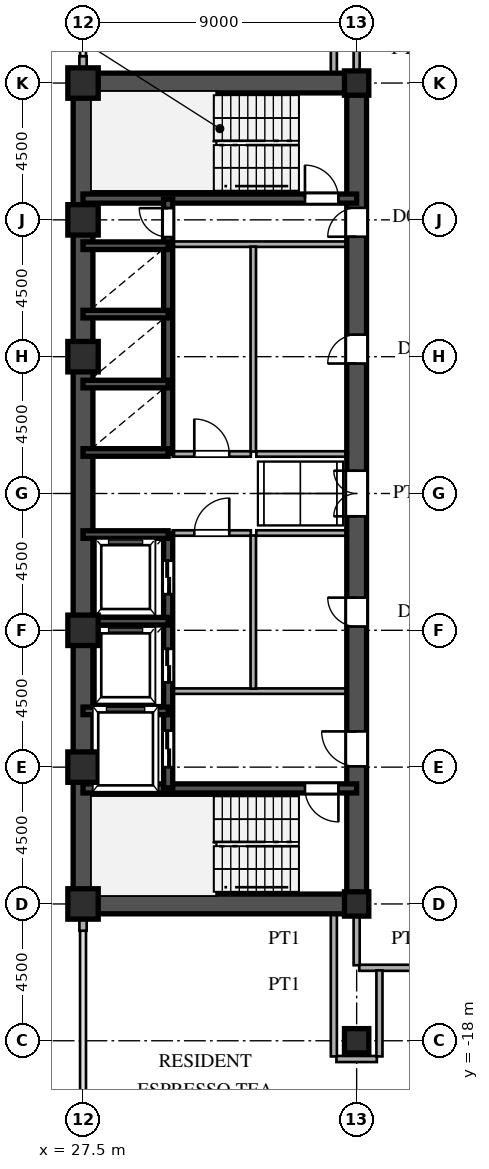
"""IFC4 building model, lengths in metres.
Left out: names, types, materials, properties, quantities, classifications, styles, units other than length and angle.
Written with IfcOpenShell. Run it as: python <this file> out.ifc"""

import sys

from ifc_helpers import new_model, si_unit, direction, frame, frame_2d, origin, origin_2d, place, context, subcontext, project, spatial, rectangle, hollow_rectangle, i_section, extrude, source, transform, mapped, element, fill, save


model = new_model("IFC4")
c1 = context("Model", 3, precision=1e-05, world=origin(), true_north=direction((0.0, 1.0)))
c2 = subcontext(c1, "Body", "Model", "MODEL_VIEW")
j1 = project(units=[si_unit("LENGTHUNIT", "METRE"), si_unit("PLANEANGLEUNIT", "RADIAN")], contexts=[c1])
p1 = place(None, origin())
s1 = spatial("IfcSite", under=j1, at=p1, CompositionType="ELEMENT")
p2 = place(p1, origin())
s2 = spatial("IfcBuilding", under=s1, at=p2, CompositionType="ELEMENT")
p3 = place(p2, frame((0.0, 0.0, 106.8)))
s3 = spatial("IfcBuildingStorey", under=s2, at=p3, CompositionType="ELEMENT", Elevation=106.8)
m1 = source(origin(), c2, "Body", "SweptSolid", [
    extrude(hollow_rectangle(XDim=1.0, YDim=1.0, WallThickness=0.042, at=origin_2d()), origin(), (0.0, 0.0, 1.0), 3.6),
])
for number, where, z_axis, x_axis in (
    (1, (27.5, -13.5, 0.0), (0.0, 0.0, 1.0), (1.0, 0.0, 0.0)),
    (2, (27.5, -9.0, 0.0), (0.0, 0.0, 1.0), (1.0, 0.0, 0.0)),
    (3, (27.5, -4.5, 0.0), (0.0, 0.0, 1.0), (1.0, 0.0, 0.0)),
    (4, (27.5, 4.5, 0.0), (0.0, 0.0, 1.0), (1.0, 0.0, 0.0)),
    (5, (27.5, 9.0, 0.0), (0.0, 0.0, 1.0), (1.0, 0.0, 0.0)),
    (6, (27.5, 13.5, 0.0), (0.0, 0.0, 1.0), (1.0, 0.0, 0.0)),
):
    element("IfcColumn", number, at=place(p3, frame(where, z_axis=z_axis, x_axis=x_axis)), inside=s3, PredefinedType="COLUMN", context=c2, shape_type="MappedRepresentation", body=[
        mapped(m1, transform((0.0, 0.0, 0.0), scale=1.0)),
    ])
m2 = source(origin(), c2, "Body", "SweptSolid", [
    extrude(i_section(OverallWidth=0.8, OverallDepth=0.8, WebThickness=0.032, FlangeThickness=0.05, at=origin_2d()), origin(), (0.0, 0.0, 1.0), 3.6),
])
for number, where, z_axis, x_axis in (
    (7, (36.5, -18.0, 0.0), (0.0, 0.0, 1.0), (1.0, 0.0, 0.0)),
    (8, (36.5, -13.5, 0.0), (0.0, 0.0, 1.0), (1.0, 0.0, 0.0)),
    (9, (36.5, 13.5, 0.0), (0.0, 0.0, 1.0), (1.0, 0.0, 0.0)),
):
    element("IfcColumn", number, at=place(p3, frame(where, z_axis=z_axis, x_axis=x_axis)), inside=s3, PredefinedType="COLUMN", context=c2, shape_type="MappedRepresentation", body=[
        mapped(m2, transform((0.0, 0.0, 0.0), scale=1.0)),
    ])
for number, where, z_axis, x_axis in (
    (10, (27.5, -14.38, 0.0), (0.0, 0.0, 1.0), (0.0, 1.0, 0.0)),
    (11, (27.5, 13.83, 0.0), (0.0, 0.0, 1.0), (0.0, 1.0, 0.0)),
):
    element("IfcWall", number, at=place(p3, frame(where, z_axis=z_axis, x_axis=x_axis)), inside=s3, PredefinedType="SOLIDWALL", context=c2, shape_type="SweptSolid", body=[
        extrude(rectangle(XDim=0.55, YDim=0.24, at=frame_2d((0.275, 0.0))), origin(), (0.0, 0.0, 1.0), 1.88),
    ])
for number, where, z_axis, x_axis in (
    (12, (27.5, -13.5, 0.0), (0.0, 0.0, 1.0), (0.0, 1.0, 0.0)),
    (13, (27.5, 1.3, 0.0), (0.0, 0.0, 1.0), (0.0, 1.0, 0.0)),
):
    element("IfcWall", number, at=place(p3, frame(where, z_axis=z_axis, x_axis=x_axis)), inside=s3, PredefinedType="SHEAR", context=c2, shape_type="SweptSolid", body=[
        extrude(rectangle(XDim=12.2, YDim=0.65, at=frame_2d((6.1, 0.0))), origin(), (0.0, 0.0, 1.0), 3.38),
    ])
p4 = place(p3, frame((27.5, -1.3, 0.0), z_axis=(0.0, 0.0, 1.0), x_axis=(0.0, 1.0, 0.0)))
e14 = element("IfcWall", 14, at=p4, inside=s3, PredefinedType="SHEAR", context=c2, shape_type="SweptSolid", body=[
    extrude(rectangle(XDim=2.6, YDim=0.65, at=frame_2d((1.3, 0.0))), origin(), (0.0, 0.0, 1.0), 3.38),
])
for number, where, z_axis, x_axis in (
    (15, (27.5, -13.5, 0.0), (0.0, 0.0, 1.0), (1.0, 0.0, 0.0)),
    (16, (27.5, 13.5, 0.0), (0.0, 0.0, 1.0), (1.0, 0.0, 0.0)),
):
    element("IfcWall", number, at=place(p3, frame(where, z_axis=z_axis, x_axis=x_axis)), inside=s3, PredefinedType="SHEAR", context=c2, shape_type="SweptSolid", body=[
        extrude(rectangle(XDim=9.0, YDim=0.65, at=frame_2d((4.5, 0.0))), origin(), (0.0, 0.0, 1.0), 3.38),
    ])
p5 = place(p3, frame((36.5, -13.65, 0.0), z_axis=(0.0, 0.0, 1.0), x_axis=(0.0, 1.0, 0.0)))
e17 = element("IfcWall", 17, at=p5, inside=s3, PredefinedType="SHEAR", context=c2, shape_type="SweptSolid", body=[
    extrude(rectangle(XDim=7.15, YDim=0.65, at=frame_2d((3.575, 0.0))), origin(), (0.0, 0.0, 1.0), 3.38),
])
p6 = place(p5, frame((4.675, 0.0, 0.0)))
e18 = element("IfcOpeningElement", 18, at=p6, cuts=e17, PredefinedType="OPENING", context=c2, shape_type="SweptSolid", body=[
    extrude(rectangle(XDim=1.15, YDim=2.2, at=frame_2d((0.575, 1.1))), frame((0.0, 0.335, 0.0), z_axis=(0.0, -1.0, 0.0), x_axis=(1.0, 0.0, 0.0)), (0.0, 0.0, 1.0), 0.67),
])
p7 = place(p3, frame((36.5, -1.3, 0.0), z_axis=(0.0, 0.0, 1.0), x_axis=(0.0, 1.0, 0.0)))
e19 = element("IfcWall", 19, at=p7, inside=s3, PredefinedType="SHEAR", context=c2, shape_type="SweptSolid", body=[
    extrude(rectangle(XDim=2.6, YDim=0.65, at=frame_2d((1.3, 0.0))), origin(), (0.0, 0.0, 1.0), 3.38),
])
p8 = place(p7, frame((0.55, 0.0, 0.0)))
e20 = element("IfcOpeningElement", 20, at=p8, cuts=e19, PredefinedType="OPENING", context=c2, shape_type="SweptSolid", body=[
    extrude(rectangle(XDim=1.5, YDim=2.3, at=frame_2d((0.75, 1.15))), frame((0.0, 0.335, 0.0), z_axis=(0.0, -1.0, 0.0), x_axis=(1.0, 0.0, 0.0)), (0.0, 0.0, 1.0), 0.67),
])
p9 = place(p3, frame((36.5, 8.2, 0.0), z_axis=(0.0, 0.0, 1.0), x_axis=(0.0, 1.0, 0.0)))
e21 = element("IfcWall", 21, at=p9, inside=s3, PredefinedType="SHEAR", context=c2, shape_type="SweptSolid", body=[
    extrude(rectangle(XDim=5.45, YDim=0.65, at=frame_2d((2.725, 0.0))), origin(), (0.0, 0.0, 1.0), 3.38),
])
p10 = place(p9, frame((0.245, 0.0, 0.0)))
e22 = element("IfcOpeningElement", 22, at=p10, cuts=e21, PredefinedType="OPENING", context=c2, shape_type="SweptSolid", body=[
    extrude(rectangle(XDim=0.95, YDim=2.15, at=frame_2d((0.475, 1.075))), frame((0.0, 0.335, 0.0), z_axis=(0.0, -1.0, 0.0), x_axis=(1.0, 0.0, 0.0)), (0.0, 0.0, 1.0), 0.67),
])
p11 = place(p3, frame((36.5, -6.5, 0.0), z_axis=(0.0, 0.0, 1.0), x_axis=(0.0, 1.0, 0.0)))
e23 = element("IfcWall", 23, at=p11, inside=s3, PredefinedType="SHEAR", context=c2, shape_type="SweptSolid", body=[
    extrude(rectangle(XDim=5.2, YDim=0.65, at=frame_2d((2.6, 0.0))), origin(), (0.0, 0.0, 1.0), 3.38),
])
p12 = place(p11, frame((2.125, 0.0, 0.0)))
e24 = element("IfcOpeningElement", 24, at=p12, cuts=e23, PredefinedType="OPENING", context=c2, shape_type="SweptSolid", body=[
    extrude(rectangle(XDim=0.95, YDim=2.15, at=frame_2d((0.475, 1.075))), frame((0.0, 0.335, 0.0), z_axis=(0.0, -1.0, 0.0), x_axis=(1.0, 0.0, 0.0)), (0.0, 0.0, 1.0), 0.67),
])
p13 = place(p3, frame((36.5, 1.3, 0.0), z_axis=(0.0, 0.0, 1.0), x_axis=(0.0, 1.0, 0.0)))
e25 = element("IfcWall", 25, at=p13, inside=s3, PredefinedType="SHEAR", context=c2, shape_type="SweptSolid", body=[
    extrude(rectangle(XDim=6.9, YDim=0.65, at=frame_2d((3.45, 0.0))), origin(), (0.0, 0.0, 1.0), 3.38),
])
p14 = place(p13, frame((2.975, 0.0, 0.0)))
e26 = element("IfcOpeningElement", 26, at=p14, cuts=e25, PredefinedType="OPENING", context=c2, shape_type="SweptSolid", body=[
    extrude(rectangle(XDim=0.95, YDim=2.15, at=frame_2d((0.475, 1.075))), frame((0.0, 0.335, 0.0), z_axis=(0.0, -1.0, 0.0), x_axis=(1.0, 0.0, 0.0)), (0.0, 0.0, 1.0), 0.67),
])
p15 = place(p3, frame((27.5, -9.7, 0.0), z_axis=(0.0, 0.0, 1.0), x_axis=(1.0, 0.0, 0.0)))
e27 = element("IfcWall", 27, at=p15, inside=s3, PredefinedType="SHEAR", context=c2, shape_type="SweptSolid", body=[
    extrude(rectangle(XDim=9.0, YDim=0.3, at=frame_2d((4.5, 0.0))), origin(), (0.0, 0.0, 1.0), 3.38),
])
p16 = place(p15, frame((7.3, 0.0, 0.0)))
e28 = element("IfcOpeningElement", 28, at=p16, cuts=e27, PredefinedType="OPENING", context=c2, shape_type="SweptSolid", body=[
    extrude(rectangle(XDim=1.1, YDim=2.2, at=frame_2d((0.55, 1.1))), frame((0.0, 0.16, 0.0), z_axis=(0.0, -1.0, 0.0), x_axis=(1.0, 0.0, 0.0)), (0.0, 0.0, 1.0), 0.32),
])
p17 = place(p3, frame((27.5, 9.7, 0.0), z_axis=(0.0, 0.0, 1.0), x_axis=(1.0, 0.0, 0.0)))
e29 = element("IfcWall", 29, at=p17, inside=s3, PredefinedType="SHEAR", context=c2, shape_type="SweptSolid", body=[
    extrude(rectangle(XDim=9.0, YDim=0.3, at=frame_2d((4.5, 0.0))), origin(), (0.0, 0.0, 1.0), 3.38),
])
p18 = place(p17, frame((7.3, 0.0, 0.0)))
e30 = element("IfcOpeningElement", 30, at=p18, cuts=e29, PredefinedType="OPENING", context=c2, shape_type="SweptSolid", body=[
    extrude(rectangle(XDim=1.1, YDim=2.2, at=frame_2d((0.55, 1.1))), frame((0.0, 0.16, 0.0), z_axis=(0.0, -1.0, 0.0), x_axis=(1.0, 0.0, 0.0)), (0.0, 0.0, 1.0), 0.32),
])
for number, where, z_axis, x_axis in (
    (31, (27.5, -7.15, 0.0), (0.0, 0.0, 1.0), (1.0, 0.0, 0.0)),
    (32, (27.5, -4.2, 0.0), (0.0, 0.0, 1.0), (1.0, 0.0, 0.0)),
    (33, (27.5, -1.35, 0.0), (0.0, 0.0, 1.0), (1.0, 0.0, 0.0)),
    (34, (27.5, 1.35, 0.0), (0.0, 0.0, 1.0), (1.0, 0.0, 0.0)),
    (35, (27.5, 3.6, 0.0), (0.0, 0.0, 1.0), (1.0, 0.0, 0.0)),
    (36, (27.5, 5.9, 0.0), (0.0, 0.0, 1.0), (1.0, 0.0, 0.0)),
    (37, (27.5, 8.15, 0.0), (0.0, 0.0, 1.0), (1.0, 0.0, 0.0)),
):
    element("IfcWall", number, at=place(p3, frame(where, z_axis=z_axis, x_axis=x_axis)), inside=s3, PredefinedType="SHEAR", context=c2, shape_type="SweptSolid", body=[
        extrude(rectangle(XDim=2.8, YDim=0.25, at=frame_2d((1.4, 0.0))), origin(), (0.0, 0.0, 1.0), 3.38),
    ])
p19 = place(p3, frame((30.3, -9.68, 0.0), z_axis=(0.0, 0.0, 1.0), x_axis=(0.0, 1.0, 0.0)))
e38 = element("IfcWall", 38, at=p19, inside=s3, PredefinedType="SHEAR", context=c2, shape_type="SweptSolid", body=[
    extrude(rectangle(XDim=2.56, YDim=0.3, at=frame_2d((1.28, 0.0))), origin(), (0.0, 0.0, 1.0), 3.38),
])
p20 = place(p19, frame((0.68, 0.0, 0.0)))
e39 = element("IfcOpeningElement", 39, at=p20, cuts=e38, PredefinedType="OPENING", context=c2, shape_type="SweptSolid", body=[
    extrude(rectangle(XDim=1.2, YDim=2.25, at=frame_2d((0.6, 1.125))), frame((0.0, 0.16, 0.0), z_axis=(0.0, -1.0, 0.0), x_axis=(1.0, 0.0, 0.0)), (0.0, 0.0, 1.0), 0.32),
])
p21 = place(p3, frame((30.3, -7.12, 0.0), z_axis=(0.0, 0.0, 1.0), x_axis=(0.0, 1.0, 0.0)))
e40 = element("IfcWall", 40, at=p21, inside=s3, PredefinedType="SHEAR", context=c2, shape_type="SweptSolid", body=[
    extrude(rectangle(XDim=2.92, YDim=0.3, at=frame_2d((1.46, 0.0))), origin(), (0.0, 0.0, 1.0), 3.38),
])
p22 = place(p21, frame((0.91, 0.0, 0.0)))
e41 = element("IfcOpeningElement", 41, at=p22, cuts=e40, PredefinedType="OPENING", context=c2, shape_type="SweptSolid", body=[
    extrude(rectangle(XDim=1.1, YDim=2.2, at=frame_2d((0.55, 1.1))), frame((0.0, 0.16, 0.0), z_axis=(0.0, -1.0, 0.0), x_axis=(1.0, 0.0, 0.0)), (0.0, 0.0, 1.0), 0.32),
])
p23 = place(p3, frame((30.3, -4.2, 0.0), z_axis=(0.0, 0.0, 1.0), x_axis=(0.0, 1.0, 0.0)))
e42 = element("IfcWall", 42, at=p23, inside=s3, PredefinedType="SHEAR", context=c2, shape_type="SweptSolid", body=[
    extrude(rectangle(XDim=2.88, YDim=0.3, at=frame_2d((1.44, 0.0))), origin(), (0.0, 0.0, 1.0), 3.38),
])
p24 = place(p23, frame((0.89, 0.0, 0.0)))
e43 = element("IfcOpeningElement", 43, at=p24, cuts=e42, PredefinedType="OPENING", context=c2, shape_type="SweptSolid", body=[
    extrude(rectangle(XDim=1.1, YDim=2.2, at=frame_2d((0.55, 1.1))), frame((0.0, 0.16, 0.0), z_axis=(0.0, -1.0, 0.0), x_axis=(1.0, 0.0, 0.0)), (0.0, 0.0, 1.0), 0.32),
])
p25 = place(p3, frame((30.3, 1.32, 0.0), z_axis=(0.0, 0.0, 1.0), x_axis=(0.0, 1.0, 0.0)))
e44 = element("IfcWall", 44, at=p25, inside=s3, PredefinedType="SHEAR", context=c2, shape_type="SweptSolid", body=[
    extrude(rectangle(XDim=2.28, YDim=0.3, at=frame_2d((1.14, 0.0))), origin(), (0.0, 0.0, 1.0), 3.38),
])
p26 = place(p3, frame((30.3, 3.6, 0.0), z_axis=(0.0, 0.0, 1.0), x_axis=(0.0, 1.0, 0.0)))
e45 = element("IfcWall", 45, at=p26, inside=s3, PredefinedType="SHEAR", context=c2, shape_type="SweptSolid", body=[
    extrude(rectangle(XDim=2.3, YDim=0.3, at=frame_2d((1.15, 0.0))), origin(), (0.0, 0.0, 1.0), 3.38),
])
p27 = place(p3, frame((30.3, 5.9, 0.0), z_axis=(0.0, 0.0, 1.0), x_axis=(0.0, 1.0, 0.0)))
e46 = element("IfcWall", 46, at=p27, inside=s3, PredefinedType="SHEAR", context=c2, shape_type="SweptSolid", body=[
    extrude(rectangle(XDim=2.25, YDim=0.3, at=frame_2d((1.125, 0.0))), origin(), (0.0, 0.0, 1.0), 3.38),
])
p28 = place(p3, frame((30.3, 8.15, 0.0), z_axis=(0.0, 0.0, 1.0), x_axis=(0.0, 1.0, 0.0)))
e47 = element("IfcWall", 47, at=p28, inside=s3, PredefinedType="SHEAR", context=c2, shape_type="SweptSolid", body=[
    extrude(rectangle(XDim=1.53, YDim=0.3, at=frame_2d((0.765, 0.0))), origin(), (0.0, 0.0, 1.0), 3.38),
])
p29 = place(p28, frame((0.285, 0.0, 0.0)))
e48 = element("IfcOpeningElement", 48, at=p29, cuts=e47, PredefinedType="OPENING", context=c2, shape_type="SweptSolid", body=[
    extrude(rectangle(XDim=0.95, YDim=2.15, at=frame_2d((0.475, 1.075))), frame((0.0, 0.16, 0.0), z_axis=(0.0, -1.0, 0.0), x_axis=(1.0, 0.0, 0.0)), (0.0, 0.0, 1.0), 0.32),
])
for number, where, z_axis, x_axis in (
    (49, (30.45, -6.5, 0.0), (0.0, 0.0, 1.0), (1.0, 0.0, 0.0)),
    (50, (30.45, 8.2, 0.0), (0.0, 0.0, 1.0), (1.0, 0.0, 0.0)),
):
    element("IfcWall", number, at=place(p3, frame(where, z_axis=z_axis, x_axis=x_axis)), inside=s3, PredefinedType="PARTITIONING", context=c2, shape_type="SweptSolid", body=[
        extrude(rectangle(XDim=5.7, YDim=0.18, at=frame_2d((2.85, 0.0))), origin(), (0.0, 0.0, 1.0), 3.38),
    ])
p30 = place(p3, frame((33.1, -6.42, 0.0), z_axis=(0.0, 0.0, 1.0), x_axis=(0.0, 1.0, 0.0)))
e51 = element("IfcWall", 51, at=p30, inside=s3, PredefinedType="PARTITIONING", context=c2, shape_type="SweptSolid", body=[
    extrude(rectangle(XDim=5.04, YDim=0.18, at=frame_2d((2.52, 0.0))), origin(), (0.0, 0.0, 1.0), 3.38),
])
p31 = place(p3, frame((33.1, 1.38, 0.0), z_axis=(0.0, 0.0, 1.0), x_axis=(0.0, 1.0, 0.0)))
e52 = element("IfcWall", 52, at=p31, inside=s3, PredefinedType="PARTITIONING", context=c2, shape_type="SweptSolid", body=[
    extrude(rectangle(XDim=6.74, YDim=0.18, at=frame_2d((3.37, 0.0))), origin(), (0.0, 0.0, 1.0), 3.38),
])
p32 = place(p3, frame((30.45, -1.3, 0.0), z_axis=(0.0, 0.0, 1.0), x_axis=(1.0, 0.0, 0.0)))
e53 = element("IfcWall", 53, at=p32, inside=s3, PredefinedType="PARTITIONING", context=c2, shape_type="SweptSolid", body=[
    extrude(rectangle(XDim=2.57, YDim=0.18, at=frame_2d((1.285, 0.0))), origin(), (0.0, 0.0, 1.0), 3.38),
])
p33 = place(p32, frame((0.71, 0.0, 0.0)))
e54 = element("IfcOpeningElement", 54, at=p33, cuts=e53, PredefinedType="OPENING", context=c2, shape_type="SweptSolid", body=[
    extrude(rectangle(XDim=1.15, YDim=2.2, at=frame_2d((0.575, 1.1))), frame((0.0, 0.1, 0.0), z_axis=(0.0, -1.0, 0.0), x_axis=(1.0, 0.0, 0.0)), (0.0, 0.0, 1.0), 0.2),
])
p34 = place(p3, frame((30.45, 1.3, 0.0), z_axis=(0.0, 0.0, 1.0), x_axis=(1.0, 0.0, 0.0)))
e55 = element("IfcWall", 55, at=p34, inside=s3, PredefinedType="PARTITIONING", context=c2, shape_type="SweptSolid", body=[
    extrude(rectangle(XDim=2.57, YDim=0.18, at=frame_2d((1.285, 0.0))), origin(), (0.0, 0.0, 1.0), 3.38),
])
p35 = place(p34, frame((0.71, 0.0, 0.0)))
e56 = element("IfcOpeningElement", 56, at=p35, cuts=e55, PredefinedType="OPENING", context=c2, shape_type="SweptSolid", body=[
    extrude(rectangle(XDim=1.15, YDim=2.2, at=frame_2d((0.575, 1.1))), frame((0.0, 0.1, 0.0), z_axis=(0.0, -1.0, 0.0), x_axis=(1.0, 0.0, 0.0)), (0.0, 0.0, 1.0), 0.2),
])
for number, where, z_axis, x_axis in (
    (57, (33.2, -1.3, 0.0), (0.0, 0.0, 1.0), (1.0, 0.0, 0.0)),
    (58, (33.2, 1.3, 0.0), (0.0, 0.0, 1.0), (1.0, 0.0, 0.0)),
):
    element("IfcWall", number, at=place(p3, frame(where, z_axis=z_axis, x_axis=x_axis)), inside=s3, PredefinedType="PARTITIONING", context=c2, shape_type="SweptSolid", body=[
        extrude(rectangle(XDim=2.95, YDim=0.18, at=frame_2d((1.475, 0.0))), origin(), (0.0, 0.0, 1.0), 3.38),
    ])
p36 = place(p3, frame((35.835, -18.6, 0.0), z_axis=(0.0, 0.0, 1.0), x_axis=(1.0, 0.0, 0.0)))
e59 = element("IfcWall", 59, at=p36, inside=s3, PredefinedType="PARTITIONING", context=c2, shape_type="SweptSolid", body=[
    extrude(rectangle(XDim=1.33, YDim=0.2, at=frame_2d((0.665, 0.0))), origin(), (0.0, 0.0, 1.0), 3.38),
])
p37 = place(p3, frame((36.585, -15.6, 0.0), z_axis=(0.0, 0.0, 1.0), x_axis=(1.0, 0.0, 0.0)))
e60 = element("IfcWall", 60, at=p37, inside=s3, PredefinedType="PARTITIONING", context=c2, shape_type="SweptSolid", body=[
    extrude(rectangle(XDim=3.18, YDim=0.2, at=frame_2d((1.59, 0.0))), origin(), (0.0, 0.0, 1.0), 3.38),
])
for number, where, z_axis, x_axis in (
    (61, (35.75, -18.515, 0.0), (0.0, 0.0, 1.0), (0.0, 1.0, 0.0)),
    (62, (35.75, 13.83, 0.0), (0.0, 0.0, 1.0), (0.0, 1.0, 0.0)),
):
    element("IfcWall", number, at=place(p3, frame(where, z_axis=z_axis, x_axis=x_axis)), inside=s3, PredefinedType="PARTITIONING", context=c2, shape_type="SweptSolid", body=[
        extrude(rectangle(XDim=4.685, YDim=0.2, at=frame_2d((2.342, 0.0))), origin(), (0.0, 0.0, 1.0), 3.38),
    ])
for number, where, z_axis, x_axis in (
    (63, (36.5, -15.515, 0.0), (0.0, 0.0, 1.0), (0.0, 1.0, 0.0)),
    (64, (36.5, 13.83, 0.0), (0.0, 0.0, 1.0), (0.0, 1.0, 0.0)),
):
    element("IfcWall", number, at=place(p3, frame(where, z_axis=z_axis, x_axis=x_axis)), inside=s3, PredefinedType="PARTITIONING", context=c2, shape_type="SweptSolid", body=[
        extrude(rectangle(XDim=1.685, YDim=0.2, at=frame_2d((0.842, 0.0))), origin(), (0.0, 0.0, 1.0), 1.38),
    ])
p38 = place(p3, frame((37.25, -18.515, 0.0), z_axis=(0.0, 0.0, 1.0), x_axis=(0.0, 1.0, 0.0)))
e65 = element("IfcWall", 65, at=p38, inside=s3, PredefinedType="PARTITIONING", context=c2, shape_type="SweptSolid", body=[
    extrude(rectangle(XDim=2.83, YDim=0.2, at=frame_2d((1.415, 0.0))), origin(), (0.0, 0.0, 1.0), 3.38),
])
m3 = source(origin(), c2, "Body", "SweptSolid", [
    extrude(rectangle(XDim=1.15, YDim=2.2, at=frame_2d((0.575, 1.1))), frame((0.0, 0.025, 0.0), z_axis=(0.0, -1.0, 0.0), x_axis=(1.0, 0.0, 0.0)), (0.0, 0.0, 1.0), 0.05),
])
p39 = place(p6, origin())
e66 = element("IfcDoor", 66, at=p39, inside=s3, OperationType="SINGLE_SWING_RIGHT", PredefinedType="DOOR", context=c2, shape_type="MappedRepresentation", body=[
    mapped(m3, transform((0.0, 0.0, 0.0), scale=1.0)),
])
fill(e18, e66)
m4 = source(origin(), c2, "Body", "SweptSolid", [
    extrude(rectangle(XDim=1.5, YDim=2.3, at=frame_2d((0.75, 1.15))), frame((0.0, 0.025, 0.0), z_axis=(0.0, -1.0, 0.0), x_axis=(1.0, 0.0, 0.0)), (0.0, 0.0, 1.0), 0.05),
])
p40 = place(p8, origin())
e67 = element("IfcDoor", 67, at=p40, inside=s3, OperationType="DOUBLE_SWING_LEFT", PredefinedType="DOOR", context=c2, shape_type="MappedRepresentation", body=[
    mapped(m4, transform((0.0, 0.0, 0.0), scale=1.0)),
])
fill(e20, e67)
m5 = source(origin(), c2, "Body", "SweptSolid", [
    extrude(rectangle(XDim=0.95, YDim=2.15, at=frame_2d((0.475, 1.075))), frame((0.0, 0.025, 0.0), z_axis=(0.0, -1.0, 0.0), x_axis=(1.0, 0.0, 0.0)), (0.0, 0.0, 1.0), 0.05),
])
p41 = place(p10, origin())
e68 = element("IfcDoor", 68, at=p41, inside=s3, OperationType="SINGLE_SWING_LEFT", PredefinedType="DOOR", context=c2, shape_type="MappedRepresentation", body=[
    mapped(m5, transform((0.0, 0.0, 0.0), scale=1.0)),
])
fill(e22, e68)
p42 = place(p12, origin())
e69 = element("IfcDoor", 69, at=p42, inside=s3, OperationType="SINGLE_SWING_RIGHT", PredefinedType="DOOR", context=c2, shape_type="MappedRepresentation", body=[
    mapped(m5, transform((0.0, 0.0, 0.0), scale=1.0)),
])
fill(e24, e69)
p43 = place(p14, origin())
e70 = element("IfcDoor", 70, at=p43, inside=s3, OperationType="SINGLE_SWING_LEFT", PredefinedType="DOOR", context=c2, shape_type="MappedRepresentation", body=[
    mapped(m5, transform((0.0, 0.0, 0.0), scale=1.0)),
])
fill(e26, e70)
m6 = source(origin(), c2, "Body", "SweptSolid", [
    extrude(rectangle(XDim=1.1, YDim=2.2, at=frame_2d((0.55, 1.1))), frame((0.0, 0.025, 0.0), z_axis=(0.0, -1.0, 0.0), x_axis=(1.0, 0.0, 0.0)), (0.0, 0.0, 1.0), 0.05),
])
p44 = place(p16, frame((1.1, 0.0, 0.0), z_axis=(0.0, 0.0, 1.0), x_axis=(-1.0, 0.0, 0.0)))
e71 = element("IfcDoor", 71, at=p44, inside=s3, OperationType="SINGLE_SWING_RIGHT", PredefinedType="DOOR", context=c2, shape_type="MappedRepresentation", body=[
    mapped(m6, transform((0.0, 0.0, 0.0), scale=1.0)),
])
fill(e28, e71)
p45 = place(p18, origin())
e72 = element("IfcDoor", 72, at=p45, inside=s3, OperationType="SINGLE_SWING_LEFT", PredefinedType="DOOR", context=c2, shape_type="MappedRepresentation", body=[
    mapped(m6, transform((0.0, 0.0, 0.0), scale=1.0)),
])
fill(e30, e72)
m7 = source(origin(), c2, "Body", "SweptSolid", [
    extrude(rectangle(XDim=1.2, YDim=2.25, at=frame_2d((0.6, 1.125))), frame((0.0, 0.025, 0.0), z_axis=(0.0, -1.0, 0.0), x_axis=(1.0, 0.0, 0.0)), (0.0, 0.0, 1.0), 0.05),
])
p46 = place(p20, origin())
e73 = element("IfcDoor", 73, at=p46, inside=s3, OperationType="DOUBLE_DOOR_SLIDING", PredefinedType="DOOR", context=c2, shape_type="MappedRepresentation", body=[
    mapped(m7, transform((0.0, 0.0, 0.0), scale=1.0)),
])
fill(e39, e73)
m8 = source(origin(), c2, "Body", "SweptSolid", [
    extrude(rectangle(XDim=1.1, YDim=2.2, at=frame_2d((0.55, 1.1))), frame((0.0, 0.025, 0.0), z_axis=(0.0, -1.0, 0.0), x_axis=(1.0, 0.0, 0.0)), (0.0, 0.0, 1.0), 0.05),
])
p47 = place(p22, origin())
e74 = element("IfcDoor", 74, at=p47, inside=s3, OperationType="DOUBLE_DOOR_SLIDING", PredefinedType="DOOR", context=c2, shape_type="MappedRepresentation", body=[
    mapped(m8, transform((0.0, 0.0, 0.0), scale=1.0)),
])
fill(e41, e74)
p48 = place(p24, origin())
e75 = element("IfcDoor", 75, at=p48, inside=s3, OperationType="DOUBLE_DOOR_SLIDING", PredefinedType="DOOR", context=c2, shape_type="MappedRepresentation", body=[
    mapped(m8, transform((0.0, 0.0, 0.0), scale=1.0)),
])
fill(e43, e75)
p49 = place(p29, origin())
e76 = element("IfcDoor", 76, at=p49, inside=s3, OperationType="SINGLE_SWING_RIGHT", PredefinedType="DOOR", context=c2, shape_type="MappedRepresentation", body=[
    mapped(m5, transform((0.0, 0.0, 0.0), scale=1.0)),
])
fill(e48, e76)
p50 = place(p33, origin())
e77 = element("IfcDoor", 77, at=p50, inside=s3, OperationType="SINGLE_SWING_RIGHT", PredefinedType="DOOR", context=c2, shape_type="MappedRepresentation", body=[
    mapped(m3, transform((0.0, 0.0, 0.0), scale=1.0)),
])
fill(e54, e77)
p51 = place(p35, origin())
e78 = element("IfcDoor", 78, at=p51, inside=s3, OperationType="SINGLE_SWING_LEFT", PredefinedType="DOOR", context=c2, shape_type="MappedRepresentation", body=[
    mapped(m3, transform((0.0, 0.0, 0.0), scale=1.0)),
])
fill(e56, e78)
save(model, sys.argv[1])
